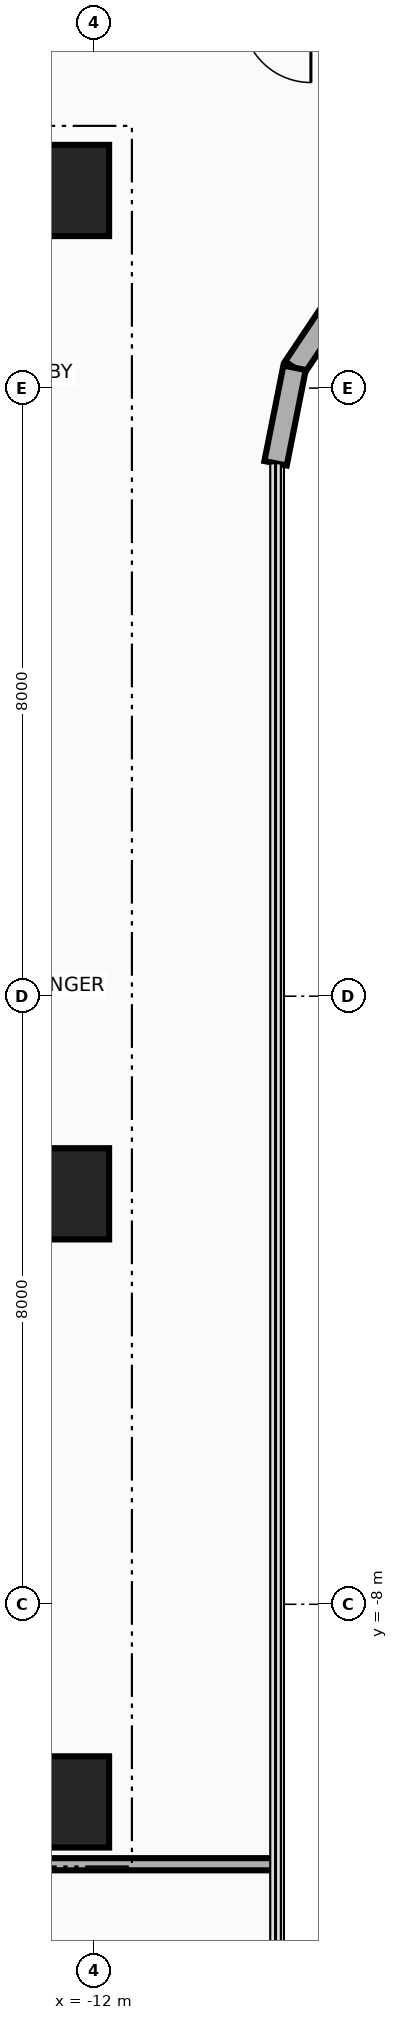
"""IFC4 building model, lengths in metres.
Left out: names, types, materials, properties, quantities, classifications, styles, units other than length and angle.
Written with IfcOpenShell. Run it as: python <this file> out.ifc"""

import sys

from ifc_helpers import new_model, si_unit, direction, frame, frame_2d, origin, origin_2d, place, context, subcontext, project, spatial, rectangle, extrude, source, transform, mapped, element, save


model = new_model("IFC4")
c1 = context("Model", 3, precision=1e-05, world=origin(), true_north=direction((0.0, 1.0)))
c2 = subcontext(c1, "Body", "Model", "MODEL_VIEW")
j1 = project(units=[si_unit("LENGTHUNIT", "METRE"), si_unit("PLANEANGLEUNIT", "RADIAN")], contexts=[c1])
p1 = place(None, origin())
s1 = spatial("IfcSite", under=j1, at=p1, CompositionType="ELEMENT")
p2 = place(p1, origin())
s2 = spatial("IfcBuilding", under=s1, at=p2, CompositionType="ELEMENT")
p3 = place(p2, frame((0.0, 0.0, 142.7)))
s3 = spatial("IfcBuildingStorey", under=s2, at=p3, CompositionType="ELEMENT", Elevation=142.7)
for number, where, z_axis, x_axis in (
    (1, (-22.65, 10.8, 0.0), (0.0, 0.0, 1.0), (1.0, 0.0, 0.0)),
    (2, (-22.65, -10.8, 0.0), (0.0, 0.0, 1.0), (1.0, 0.0, 0.0)),
):
    element("IfcWall", number, at=place(p3, frame(where, z_axis=z_axis, x_axis=x_axis)), inside=s3, PredefinedType="SHEAR", context=c2, shape_type="SweptSolid", body=[
        extrude(rectangle(XDim=10.25, YDim=0.7, at=frame_2d((5.125, 0.0))), origin(), (0.0, 0.0, 1.0), 3.46),
    ])
m1 = source(origin(), c2, "Body", "SweptSolid", [
    extrude(rectangle(XDim=1.2, YDim=1.2, at=origin_2d()), origin(), (0.0, 0.0, 1.0), 3.7),
])
for number, where, z_axis, x_axis in (
    (3, (-12.4, -10.6, 0.0), (0.0, 0.0, 1.0), (1.0, 0.0, 0.0)),
    (4, (-12.4, -2.6, 0.0), (0.0, 0.0, 1.0), (1.0, 0.0, 0.0)),
    (5, (-12.4, 10.6, 0.0), (0.0, 0.0, 1.0), (1.0, 0.0, 0.0)),
):
    element("IfcColumn", number, at=place(p3, frame(where, z_axis=z_axis, x_axis=x_axis)), inside=s3, PredefinedType="COLUMN", context=c2, shape_type="MappedRepresentation", body=[
        mapped(m1, transform((0.0, 0.0, 0.0), x_axis=(1.0, 0.0, 0.0), y_axis=(0.0, 1.0, 0.0), z_axis=(0.0, 0.0, 1.0), scale=1.0)),
    ])
p4 = place(p3, frame((-8.642, 9.342, 0.0), z_axis=(0.0, 0.0, 1.0), x_axis=(-0.555615398575, -0.831439431869, 0.0)))
e6 = element("IfcWall", 6, at=p4, inside=s3, PredefinedType="SOLIDWALL", context=c2, shape_type="SweptSolid", body=[
    extrude(rectangle(XDim=1.292, YDim=0.3, at=frame_2d((0.646, 0.0))), origin(), (0.0, 0.0, 1.0), 3.46),
])
p5 = place(p3, frame((-9.36, 8.268, 0.0), z_axis=(0.0, 0.0, 1.0), x_axis=(-0.195090163074, -0.980785312019, 0.0)))
e7 = element("IfcWall", 7, at=p5, inside=s3, PredefinedType="SOLIDWALL", context=c2, shape_type="SweptSolid", body=[
    extrude(rectangle(XDim=1.281, YDim=0.3, at=frame_2d((0.641, 0.0))), origin(), (0.0, 0.0, 1.0), 3.46),
])
p6 = place(p3, frame((-23.45, -11.42, 0.0), z_axis=(0.0, 0.0, 1.0), x_axis=(1.0, 0.0, 0.0)))
e8 = element("IfcWall", 8, at=p6, inside=s3, PredefinedType="PARTITIONING", context=c2, shape_type="SweptSolid", body=[
    extrude(rectangle(XDim=13.84, YDim=0.16, at=frame_2d((6.92, 0.0))), origin(), (0.0, 0.0, 1.0), 2.834),
])
save(model, sys.argv[1])
